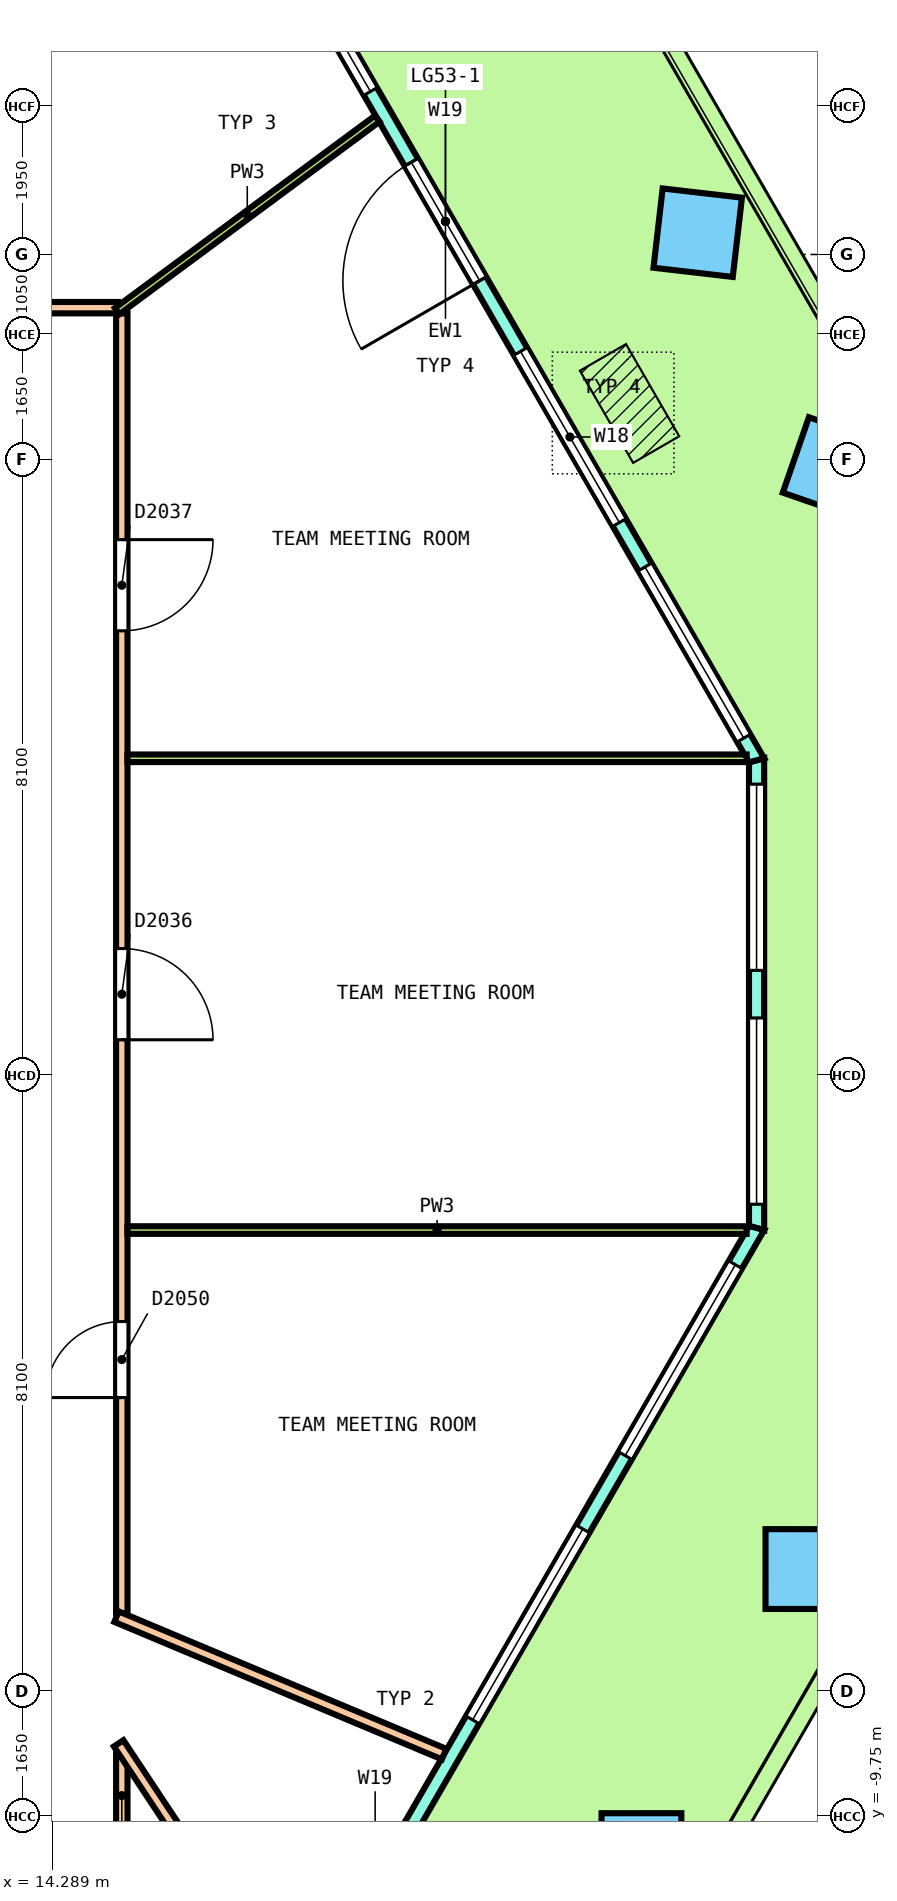
"""IFC4 building model, lengths in metres.
Left out: names, types, materials, properties, quantities, classifications, styles, units other than length and angle.
Written with IfcOpenShell. Run it as: python <this file> out.ifc"""

import sys

from ifc_helpers import new_model, si_unit, direction, frame, frame_2d, origin, origin_2d, place, context, subcontext, project, spatial, polyline, rectangle, outline, extrude, element, fill, save


model = new_model("IFC4")
c1 = context("Model", 3, precision=1e-05, world=origin(), true_north=direction((0.0, 1.0)))
c2 = subcontext(c1, "Body", "Model", "MODEL_VIEW")
j1 = project(units=[si_unit("LENGTHUNIT", "METRE"), si_unit("PLANEANGLEUNIT", "RADIAN")], contexts=[c1])
p1 = place(None, origin())
s1 = spatial("IfcSite", under=j1, at=p1, CompositionType="ELEMENT")
p2 = place(p1, origin())
s2 = spatial("IfcBuilding", under=s1, at=p2, CompositionType="ELEMENT")
p3 = place(p2, frame((0.0, 0.0, 245.4)))
s3 = spatial("IfcBuildingStorey", under=s2, at=p3, CompositionType="ELEMENT", Elevation=245.4)
p4 = place(p3, frame((24.564, 7.991, 0.0), z_axis=(0.021792492936, 0.025134899828, 0.999446508855), x_axis=(-0.499665392548, 0.866150076023, -0.010887667087)))
e1 = element("IfcColumn", 1, at=p4, inside=s3, PredefinedType="COLUMN", context=c2, shape_type="SweptSolid", body=[
    extrude(rectangle(XDim=1.05, YDim=1.05, at=origin_2d()), origin(), (0.0, 0.0, 1.0), 3.652),
])
p5 = place(p3, frame((22.777, 11.086, 0.0), z_axis=(0.025336830513, 0.018852206345, 0.999501195265), x_axis=(-0.50062764201, 0.865655090814, -0.003637004835)))
e2 = element("IfcColumn", 2, at=p5, inside=s3, PredefinedType="COLUMN", context=c2, shape_type="SweptSolid", body=[
    extrude(rectangle(XDim=1.05, YDim=1.05, at=origin_2d()), origin(), (0.0, 0.0, 1.0), 3.652),
])
p6 = place(p3, frame((22.037, -10.232, 0.0), z_axis=(0.003611703602, 0.006287039604, 0.99997371402), x_axis=(0.497890396548, 0.867209652713, -0.007250604559)))
e3 = element("IfcColumn", 3, at=p6, inside=s3, PredefinedType="COLUMN", context=c2, shape_type="SweptSolid", body=[
    extrude(rectangle(XDim=1.05, YDim=1.05, at=origin_2d()), origin(), (0.0, 0.0, 1.0), 3.65),
])
p7 = place(p3, frame((24.194, -6.495, 0.0), z_axis=(0.010899694483, 0.018857140148, 0.999762774325), x_axis=(0.500590334681, 0.865410262129, -0.021780611228)))
e4 = element("IfcColumn", 4, at=p7, inside=s3, PredefinedType="COLUMN", context=c2, shape_type="SweptSolid", body=[
    extrude(rectangle(XDim=1.05, YDim=1.05, at=origin_2d()), origin(), (0.0, 0.0, 1.0), 3.651),
])
p8 = place(p3, frame((23.551, -2.008, 0.0), z_axis=(0.0, 0.0, 1.0), x_axis=(0.0, 1.0, 0.0)))
e5 = element("IfcWall", 5, at=p8, inside=s3, PredefinedType="SOLIDWALL", context=c2, shape_type="SweptSolid", body=[
    extrude(outline(polyline([(-0.027, -0.1), (1.008, -0.1), (2.042, -0.1), (3.077, -0.1), (4.111, -0.1), (5.146, -0.1), (6.18, -0.1), (6.126, 0.1), (5.11, 0.1), (4.093, 0.1), (3.077, 0.1), (2.06, 0.1), (1.043, 0.1), (0.027, 0.1), (-0.027, -0.1)])), origin(), (0.0, 0.0, 1.0), 3.7),
])
p9 = place(p8, frame((0.313, 0.0, 0.1)))
e6 = element("IfcOpeningElement", 6, at=p9, cuts=e5, PredefinedType="OPENING", context=c2, shape_type="SweptSolid", body=[
    extrude(rectangle(XDim=2.45, YDim=2.65, at=frame_2d((1.225, 1.325))), frame((0.0, 0.11, 0.0), z_axis=(0.0, -1.0, 0.0), x_axis=(1.0, 0.0, 0.0)), (0.0, 0.0, 1.0), 0.22),
])
p10 = place(p8, frame((3.39, 0.0, 0.1)))
e7 = element("IfcOpeningElement", 7, at=p10, cuts=e5, PredefinedType="OPENING", context=c2, shape_type="SweptSolid", body=[
    extrude(rectangle(XDim=2.45, YDim=2.65, at=frame_2d((1.225, 1.325))), frame((0.0, 0.11, 0.0), z_axis=(0.0, -1.0, 0.0), x_axis=(1.0, 0.0, 0.0)), (0.0, 0.0, 1.0), 0.22),
])
p11 = place(p3, frame((23.551, 4.145, 0.0), z_axis=(0.0, 0.0, 1.0), x_axis=(-0.500004284815, 0.866022929931, 0.0)))
e8 = element("IfcWall", 8, at=p11, inside=s3, PredefinedType="SOLIDWALL", context=c2, shape_type="SweptSolid", body=[
    extrude(outline(polyline([(-0.027, -0.1), (1.0, -0.1), (2.026, -0.1), (3.053, -0.1), (4.08, -0.1), (5.106, -0.1), (6.133, -0.1), (7.159, -0.1), (8.186, -0.1), (9.212, -0.1), (10.239, -0.1), (11.266, -0.1), (12.292, -0.1), (13.319, -0.1), (14.345, -0.1), (15.372, -0.1), (16.399, -0.1), (16.345, 0.1), (15.325, 0.1), (14.305, 0.1), (13.285, 0.1), (12.265, 0.1), (11.246, 0.1), (10.226, 0.1), (9.206, 0.1), (8.186, 0.1), (7.166, 0.1), (6.146, 0.1), (5.126, 0.1), (4.106, 0.1), (3.086, 0.1), (2.067, 0.1), (1.047, 0.1), (0.027, 0.1), (-0.027, -0.1)])), origin(), (0.0, 0.0, 1.0), 3.7),
])
p12 = place(p11, frame((0.337, 0.0, 0.1)))
e9 = element("IfcOpeningElement", 9, at=p12, cuts=e8, PredefinedType="OPENING", context=c2, shape_type="SweptSolid", body=[
    extrude(rectangle(XDim=2.6, YDim=2.65, at=frame_2d((1.3, 1.325))), frame((0.0, 0.11, 0.0), z_axis=(0.0, -1.0, 0.0), x_axis=(1.0, 0.0, 0.0)), (0.0, 0.0, 1.0), 0.22),
])
p13 = place(p11, frame((3.612, 0.0, 0.1)))
e10 = element("IfcOpeningElement", 10, at=p13, cuts=e8, PredefinedType="OPENING", context=c2, shape_type="SweptSolid", body=[
    extrude(rectangle(XDim=2.6, YDim=2.65, at=frame_2d((1.3, 1.325))), frame((0.0, 0.11, 0.0), z_axis=(0.0, -1.0, 0.0), x_axis=(1.0, 0.0, 0.0)), (0.0, 0.0, 1.0), 0.22),
])
p14 = place(p11, frame((7.286, 0.0, 0.0)))
e11 = element("IfcOpeningElement", 11, at=p14, cuts=e8, PredefinedType="OPENING", context=c2, shape_type="SweptSolid", body=[
    extrude(rectangle(XDim=1.8, YDim=2.4, at=frame_2d((0.9, 1.2))), frame((0.0, 0.11, 0.0), z_axis=(0.0, -1.0, 0.0), x_axis=(1.0, 0.0, 0.0)), (0.0, 0.0, 1.0), 0.22),
])
p15 = place(p11, frame((7.286, 0.0, 2.55)))
e12 = element("IfcOpeningElement", 12, at=p15, cuts=e8, PredefinedType="OPENING", context=c2, shape_type="SweptSolid", body=[
    extrude(rectangle(XDim=1.8, YDim=0.2, at=frame_2d((0.9, 0.1))), frame((0.0, 0.11, 0.0), z_axis=(0.0, -1.0, 0.0), x_axis=(1.0, 0.0, 0.0)), (0.0, 0.0, 1.0), 0.22),
])
p16 = place(p11, frame((10.16, 0.0, 0.1)))
e13 = element("IfcOpeningElement", 13, at=p16, cuts=e8, PredefinedType="OPENING", context=c2, shape_type="SweptSolid", body=[
    extrude(rectangle(XDim=2.6, YDim=2.65, at=frame_2d((1.3, 1.325))), frame((0.0, 0.11, 0.0), z_axis=(0.0, -1.0, 0.0), x_axis=(1.0, 0.0, 0.0)), (0.0, 0.0, 1.0), 0.22),
])
p17 = place(p11, frame((13.435, 0.0, 0.1)))
e14 = element("IfcOpeningElement", 14, at=p17, cuts=e8, PredefinedType="OPENING", context=c2, shape_type="SweptSolid", body=[
    extrude(rectangle(XDim=2.6, YDim=2.65, at=frame_2d((1.3, 1.325))), frame((0.0, 0.11, 0.0), z_axis=(0.0, -1.0, 0.0), x_axis=(1.0, 0.0, 0.0)), (0.0, 0.0, 1.0), 0.22),
])
p18 = place(p3, frame((13.515, -19.392, 0.0), z_axis=(0.0, 0.0, 1.0), x_axis=(0.499997939216, 0.866026593575, 0.0)))
e15 = element("IfcWall", 15, at=p18, inside=s3, PredefinedType="SOLIDWALL", context=c2, shape_type="SweptSolid", body=[
    extrude(outline(polyline([(-0.027, -0.1), (0.979, -0.1), (1.986, -0.1), (2.992, -0.1), (3.999, -0.1), (5.005, -0.1), (6.011, -0.1), (7.018, -0.1), (8.024, -0.1), (9.03, -0.1), (10.037, -0.1), (11.043, -0.1), (12.049, -0.1), (13.056, -0.1), (14.062, -0.1), (15.068, -0.1), (16.075, -0.1), (17.081, -0.1), (18.087, -0.1), (19.094, -0.1), (20.1, -0.1), (20.046, 0.1), (19.045, 0.1), (18.044, 0.1), (17.043, 0.1), (16.042, 0.1), (15.042, 0.1), (14.041, 0.1), (13.04, 0.1), (12.039, 0.1), (11.038, 0.1), (10.037, 0.1), (9.036, 0.1), (8.035, 0.1), (7.034, 0.1), (6.033, 0.1), (5.032, 0.1), (4.031, 0.1), (3.03, 0.1), (2.029, 0.1), (1.028, 0.1), (0.027, 0.1), (-0.027, -0.1)])), origin(), (0.0, 0.0, 1.0), 3.7),
])
p19 = place(p18, frame((0.557, 0.0, 0.1)))
e16 = element("IfcOpeningElement", 16, at=p19, cuts=e15, PredefinedType="OPENING", context=c2, shape_type="SweptSolid", body=[
    extrude(rectangle(XDim=2.9, YDim=2.65, at=frame_2d((1.45, 1.325))), frame((0.0, 0.11, 0.0), z_axis=(0.0, -1.0, 0.0), x_axis=(1.0, 0.0, 0.0)), (0.0, 0.0, 1.0), 0.22),
])
p20 = place(p18, frame((4.572, 0.0, 0.1)))
e17 = element("IfcOpeningElement", 17, at=p20, cuts=e15, PredefinedType="OPENING", context=c2, shape_type="SweptSolid", body=[
    extrude(rectangle(XDim=2.9, YDim=2.65, at=frame_2d((1.45, 1.325))), frame((0.0, 0.11, 0.0), z_axis=(0.0, -1.0, 0.0), x_axis=(1.0, 0.0, 0.0)), (0.0, 0.0, 1.0), 0.22),
])
p21 = place(p18, frame((9.137, 0.0, 0.0)))
e18 = element("IfcOpeningElement", 18, at=p21, cuts=e15, PredefinedType="OPENING", context=c2, shape_type="SweptSolid", body=[
    extrude(rectangle(XDim=1.8, YDim=2.4, at=frame_2d((0.9, 1.2))), frame((0.0, 0.11, 0.0), z_axis=(0.0, -1.0, 0.0), x_axis=(1.0, 0.0, 0.0)), (0.0, 0.0, 1.0), 0.22),
])
p22 = place(p18, frame((9.137, 0.0, 2.55)))
e19 = element("IfcOpeningElement", 19, at=p22, cuts=e15, PredefinedType="OPENING", context=c2, shape_type="SweptSolid", body=[
    extrude(rectangle(XDim=1.8, YDim=0.2, at=frame_2d((0.9, 0.1))), frame((0.0, 0.11, 0.0), z_axis=(0.0, -1.0, 0.0), x_axis=(1.0, 0.0, 0.0)), (0.0, 0.0, 1.0), 0.22),
])
p23 = place(p18, frame((12.601, 0.0, 0.1)))
e20 = element("IfcOpeningElement", 20, at=p23, cuts=e15, PredefinedType="OPENING", context=c2, shape_type="SweptSolid", body=[
    extrude(rectangle(XDim=2.9, YDim=2.65, at=frame_2d((1.45, 1.325))), frame((0.0, 0.11, 0.0), z_axis=(0.0, -1.0, 0.0), x_axis=(1.0, 0.0, 0.0)), (0.0, 0.0, 1.0), 0.22),
])
p24 = place(p18, frame((16.616, 0.0, 0.1)))
e21 = element("IfcOpeningElement", 21, at=p24, cuts=e15, PredefinedType="OPENING", context=c2, shape_type="SweptSolid", body=[
    extrude(rectangle(XDim=2.9, YDim=2.65, at=frame_2d((1.45, 1.325))), frame((0.0, 0.11, 0.0), z_axis=(0.0, -1.0, 0.0), x_axis=(1.0, 0.0, 0.0)), (0.0, 0.0, 1.0), 0.22),
])
p25 = place(p3, frame((15.2, -10.025, 0.0), z_axis=(0.0, 0.0, 1.0), x_axis=(0.0, 1.0, 0.0)))
e22 = element("IfcWall", 22, at=p25, inside=s3, PredefinedType="PARTITIONING", context=c2, shape_type="SweptSolid", body=[
    extrude(rectangle(XDim=1.1, YDim=0.15, at=frame_2d((0.55, 0.0))), origin(), (0.0, 0.0, 1.0), 3.7),
])
p26 = place(p3, frame((15.2, -7.075, 0.0), z_axis=(0.0, 0.0, 1.0), x_axis=(0.0, 1.0, 0.0)))
e23 = element("IfcWall", 23, at=p26, inside=s3, PredefinedType="PARTITIONING", context=c2, shape_type="SweptSolid", body=[
    extrude(rectangle(XDim=17.1, YDim=0.15, at=frame_2d((8.55, 0.0))), origin(), (0.0, 0.0, 1.0), 2.8),
])
p27 = place(p26, frame((7.543, 0.0, 0.0)))
e24 = element("IfcOpeningElement", 24, at=p27, cuts=e23, PredefinedType="OPENING", context=c2, shape_type="SweptSolid", body=[
    extrude(rectangle(XDim=1.2, YDim=2.1, at=frame_2d((0.6, 1.05))), frame((0.0, 0.085, 0.0), z_axis=(0.0, -1.0, 0.0), x_axis=(1.0, 0.0, 0.0)), (0.0, 0.0, 1.0), 0.17),
])
p28 = place(p26, frame((12.923, 0.0, 0.0)))
e25 = element("IfcOpeningElement", 25, at=p28, cuts=e23, PredefinedType="OPENING", context=c2, shape_type="SweptSolid", body=[
    extrude(rectangle(XDim=1.2, YDim=2.1, at=frame_2d((0.6, 1.05))), frame((0.0, 0.085, 0.0), z_axis=(0.0, -1.0, 0.0), x_axis=(1.0, 0.0, 0.0)), (0.0, 0.0, 1.0), 0.17),
])
p29 = place(p26, frame((2.836, 0.0, 0.0)))
e26 = element("IfcOpeningElement", 26, at=p29, cuts=e23, PredefinedType="OPENING", context=c2, shape_type="SweptSolid", body=[
    extrude(rectangle(XDim=1.0, YDim=2.1, at=frame_2d((0.5, 1.05))), frame((0.0, 0.085, 0.0), z_axis=(0.0, -1.0, 0.0), x_axis=(1.0, 0.0, 0.0)), (0.0, 0.0, 1.0), 0.17),
])
p30 = place(p3, frame((-15.125, 10.1, 0.0), z_axis=(0.0, 0.0, 1.0), x_axis=(1.0, 0.0, 0.0)))
e27 = element("IfcWall", 27, at=p30, inside=s3, PredefinedType="PARTITIONING", context=c2, shape_type="SweptSolid", body=[
    extrude(rectangle(XDim=30.275, YDim=0.15, at=frame_2d((15.137, 0.0))), origin(), (0.0, 0.0, 1.0), 2.8),
])
p31 = place(p30, frame((28.116, 0.0, 0.0)))
e28 = element("IfcOpeningElement", 28, at=p31, cuts=e27, PredefinedType="OPENING", context=c2, shape_type="SweptSolid", body=[
    extrude(rectangle(XDim=1.0, YDim=2.1, at=frame_2d((0.5, 1.05))), frame((0.0, 0.085, 0.0), z_axis=(0.0, -1.0, 0.0), x_axis=(1.0, 0.0, 0.0)), (0.0, 0.0, 1.0), 0.17),
])
p32 = place(p30, frame((21.244, 0.0, 0.0)))
e29 = element("IfcOpeningElement", 29, at=p32, cuts=e27, PredefinedType="OPENING", context=c2, shape_type="SweptSolid", body=[
    extrude(rectangle(XDim=1.0, YDim=2.1, at=frame_2d((0.5, 1.05))), frame((0.0, 0.085, 0.0), z_axis=(0.0, -1.0, 0.0), x_axis=(1.0, 0.0, 0.0)), (0.0, 0.0, 1.0), 0.17),
])
p33 = place(p30, frame((4.226, 0.0, 0.0)))
e30 = element("IfcOpeningElement", 30, at=p33, cuts=e27, PredefinedType="OPENING", context=c2, shape_type="SweptSolid", body=[
    extrude(rectangle(XDim=1.2, YDim=2.1, at=frame_2d((0.6, 1.05))), frame((0.0, 0.085, 0.0), z_axis=(0.0, -1.0, 0.0), x_axis=(1.0, 0.0, 0.0)), (0.0, 0.0, 1.0), 0.17),
])
p34 = place(p3, frame((15.159, -8.788, 0.0), z_axis=(0.0, 0.0, 1.0), x_axis=(0.552215241224, -0.833701581718, 0.0)))
e31 = element("IfcWall", 31, at=p34, inside=s3, PredefinedType="PARTITIONING", context=c2, shape_type="SweptSolid", body=[
    extrude(rectangle(XDim=4.221, YDim=0.15, at=frame_2d((2.111, 0.0))), origin(), (0.0, 0.0, 1.0), 2.8),
])
p35 = place(p3, frame((15.131, -7.121, 0.0), z_axis=(0.0, 0.0, 1.0), x_axis=(0.922131258958, -0.386877165586, 0.0)))
e32 = element("IfcWall", 32, at=p35, inside=s3, PredefinedType="PARTITIONING", context=c2, shape_type="SweptSolid", body=[
    extrude(rectangle(XDim=4.673, YDim=0.15, at=frame_2d((2.336, 0.0))), origin(), (0.0, 0.0, 1.0), 2.8),
])
for number, where, z_axis, x_axis in (
    (33, (15.275, 4.172, 0.0), (0.0, 0.0, 1.0), (1.0, 0.0, 0.0)),
    (34, (15.275, -2.035, 0.0), (0.0, 0.0, 1.0), (1.0, 0.0, 0.0)),
):
    element("IfcWall", number, at=place(p3, frame(where, z_axis=z_axis, x_axis=x_axis)), inside=s3, PredefinedType="PARTITIONING", context=c2, shape_type="SweptSolid", body=[
        extrude(rectangle(XDim=8.146, YDim=0.1, at=frame_2d((4.073, 0.0))), origin(), (0.0, 0.0, 1.0), 2.8),
    ])
p36 = place(p3, frame((15.14, 10.055, 0.0), z_axis=(0.0, 0.0, 1.0), x_axis=(0.803940068615, 0.594710321144, 0.0)))
e35 = element("IfcWall", 35, at=p36, inside=s3, PredefinedType="PARTITIONING", context=c2, shape_type="SweptSolid", body=[
    extrude(rectangle(XDim=4.257, YDim=0.1, at=frame_2d((2.128, 0.0))), origin(), (0.0, 0.0, 1.0), 2.8),
])
p37 = place(p9, origin())
e36 = element("IfcWindow", 36, at=p37, inside=s3, PartitioningType="SINGLE_PANEL", PredefinedType="WINDOW", context=c2, shape_type="SweptSolid", body=[
    extrude(rectangle(XDim=2.45, YDim=2.65, at=frame_2d((1.225, 1.325))), frame((0.0, 0.03, 0.0), z_axis=(0.0, -1.0, 0.0), x_axis=(1.0, 0.0, 0.0)), (0.0, 0.0, 1.0), 0.06),
])
fill(e6, e36)
p38 = place(p10, origin())
e37 = element("IfcWindow", 37, at=p38, inside=s3, PartitioningType="SINGLE_PANEL", PredefinedType="WINDOW", context=c2, shape_type="SweptSolid", body=[
    extrude(rectangle(XDim=2.45, YDim=2.65, at=frame_2d((1.225, 1.325))), frame((0.0, 0.03, 0.0), z_axis=(0.0, -1.0, 0.0), x_axis=(1.0, 0.0, 0.0)), (0.0, 0.0, 1.0), 0.06),
])
fill(e7, e37)
p39 = place(p12, origin())
e38 = element("IfcWindow", 38, at=p39, inside=s3, PartitioningType="SINGLE_PANEL", PredefinedType="WINDOW", context=c2, shape_type="SweptSolid", body=[
    extrude(rectangle(XDim=2.6, YDim=2.65, at=frame_2d((1.3, 1.325))), frame((0.0, 0.03, 0.0), z_axis=(0.0, -1.0, 0.0), x_axis=(1.0, 0.0, 0.0)), (0.0, 0.0, 1.0), 0.06),
])
fill(e9, e38)
p40 = place(p13, origin())
e39 = element("IfcWindow", 39, at=p40, inside=s3, PartitioningType="SINGLE_PANEL", PredefinedType="WINDOW", context=c2, shape_type="SweptSolid", body=[
    extrude(rectangle(XDim=2.6, YDim=2.65, at=frame_2d((1.3, 1.325))), frame((0.0, 0.03, 0.0), z_axis=(0.0, -1.0, 0.0), x_axis=(1.0, 0.0, 0.0)), (0.0, 0.0, 1.0), 0.06),
])
fill(e10, e39)
p41 = place(p14, origin())
e40 = element("IfcDoor", 40, at=p41, inside=s3, OperationType="DOUBLE_DOOR_SINGLE_SWING", PredefinedType="DOOR", context=c2, shape_type="SweptSolid", body=[
    extrude(rectangle(XDim=1.8, YDim=2.4, at=frame_2d((0.9, 1.2))), frame((0.0, 0.025, 0.0), z_axis=(0.0, -1.0, 0.0), x_axis=(1.0, 0.0, 0.0)), (0.0, 0.0, 1.0), 0.05),
])
fill(e11, e40)
p42 = place(p15, origin())
e41 = element("IfcWindow", 41, at=p42, inside=s3, PartitioningType="SINGLE_PANEL", PredefinedType="WINDOW", context=c2, shape_type="SweptSolid", body=[
    extrude(rectangle(XDim=1.8, YDim=0.2, at=frame_2d((0.9, 0.1))), frame((0.0, 0.03, 0.0), z_axis=(0.0, -1.0, 0.0), x_axis=(1.0, 0.0, 0.0)), (0.0, 0.0, 1.0), 0.06),
])
fill(e12, e41)
p43 = place(p16, origin())
e42 = element("IfcWindow", 42, at=p43, inside=s3, PartitioningType="SINGLE_PANEL", PredefinedType="WINDOW", context=c2, shape_type="SweptSolid", body=[
    extrude(rectangle(XDim=2.6, YDim=2.65, at=frame_2d((1.3, 1.325))), frame((0.0, 0.03, 0.0), z_axis=(0.0, -1.0, 0.0), x_axis=(1.0, 0.0, 0.0)), (0.0, 0.0, 1.0), 0.06),
])
fill(e13, e42)
p44 = place(p23, origin())
e43 = element("IfcWindow", 43, at=p44, inside=s3, PartitioningType="SINGLE_PANEL", PredefinedType="WINDOW", context=c2, shape_type="SweptSolid", body=[
    extrude(rectangle(XDim=2.9, YDim=2.65, at=frame_2d((1.45, 1.325))), frame((0.0, 0.03, 0.0), z_axis=(0.0, -1.0, 0.0), x_axis=(1.0, 0.0, 0.0)), (0.0, 0.0, 1.0), 0.06),
])
fill(e20, e43)
p45 = place(p24, origin())
e44 = element("IfcWindow", 44, at=p45, inside=s3, PartitioningType="SINGLE_PANEL", PredefinedType="WINDOW", context=c2, shape_type="SweptSolid", body=[
    extrude(rectangle(XDim=2.9, YDim=2.65, at=frame_2d((1.45, 1.325))), frame((0.0, 0.03, 0.0), z_axis=(0.0, -1.0, 0.0), x_axis=(1.0, 0.0, 0.0)), (0.0, 0.0, 1.0), 0.06),
])
fill(e21, e44)
p46 = place(p27, origin())
e45 = element("IfcDoor", 45, at=p46, inside=s3, OperationType="DOUBLE_DOOR_SINGLE_SWING", PredefinedType="DOOR", context=c2, shape_type="SweptSolid", body=[
    extrude(rectangle(XDim=1.2, YDim=2.1, at=frame_2d((0.6, 1.05))), frame((0.0, 0.025, 0.0), z_axis=(0.0, -1.0, 0.0), x_axis=(1.0, 0.0, 0.0)), (0.0, 0.0, 1.0), 0.05),
])
fill(e24, e45)
p47 = place(p28, origin())
e46 = element("IfcDoor", 46, at=p47, inside=s3, OperationType="DOUBLE_DOOR_SINGLE_SWING", PredefinedType="DOOR", context=c2, shape_type="SweptSolid", body=[
    extrude(rectangle(XDim=1.2, YDim=2.1, at=frame_2d((0.6, 1.05))), frame((0.0, 0.025, 0.0), z_axis=(0.0, -1.0, 0.0), x_axis=(1.0, 0.0, 0.0)), (0.0, 0.0, 1.0), 0.05),
])
fill(e25, e46)
p48 = place(p29, origin())
e47 = element("IfcDoor", 47, at=p48, inside=s3, OperationType="SINGLE_SWING_RIGHT", PredefinedType="DOOR", context=c2, shape_type="SweptSolid", body=[
    extrude(rectangle(XDim=1.0, YDim=2.1, at=frame_2d((0.5, 1.05))), frame((0.0, 0.025, 0.0), z_axis=(0.0, -1.0, 0.0), x_axis=(1.0, 0.0, 0.0)), (0.0, 0.0, 1.0), 0.05),
])
fill(e26, e47)
save(model, sys.argv[1])
